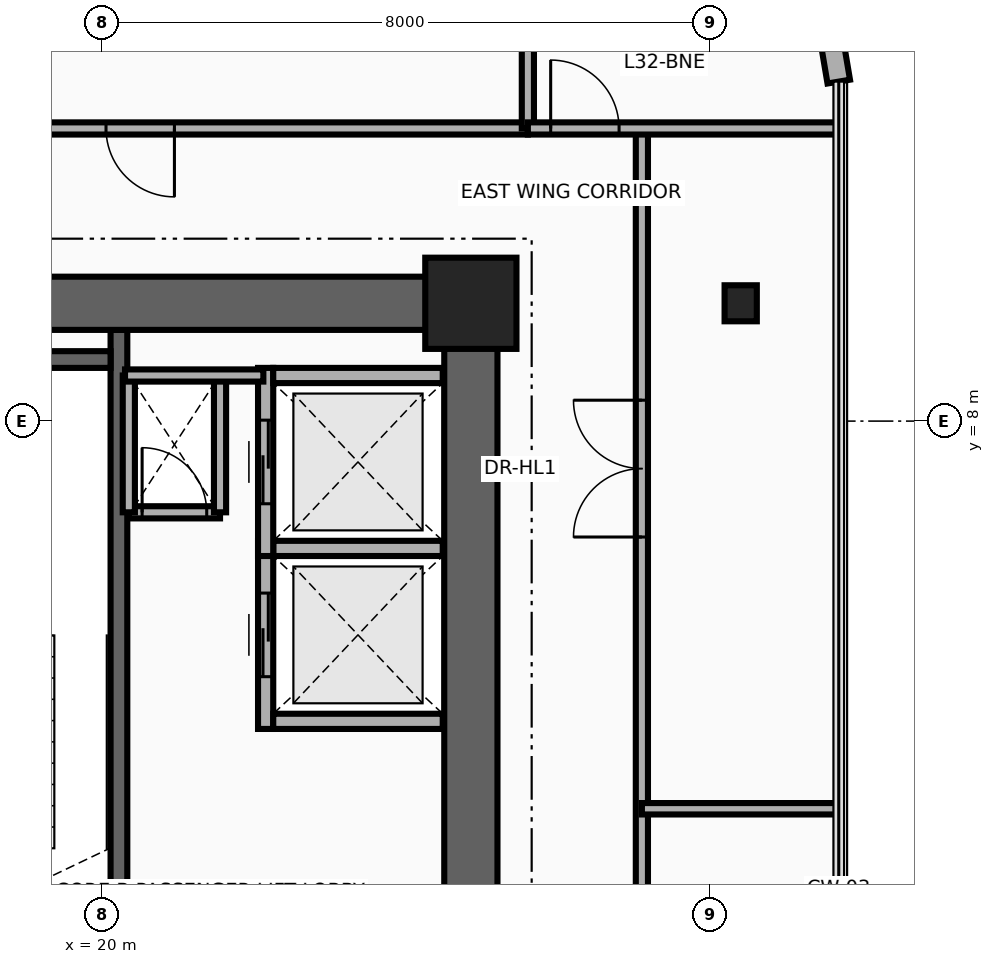
"""IFC4 building model, lengths in metres.
Left out: names, types, materials, properties, quantities, classifications, styles, units other than length and angle.
Written with IfcOpenShell. Run it as: python <this file> out.ifc"""

import sys

from ifc_helpers import new_model, si_unit, direction, frame, frame_2d, origin, origin_2d, place, context, subcontext, project, spatial, rectangle, i_section, extrude, source, transform, mapped, element, fill, save


model = new_model("IFC4")
c1 = context("Model", 3, precision=1e-05, world=origin(), true_north=direction((0.0, 1.0)))
c2 = subcontext(c1, "Body", "Model", "MODEL_VIEW")
j1 = project(units=[si_unit("LENGTHUNIT", "METRE"), si_unit("PLANEANGLEUNIT", "RADIAN")], contexts=[c1])
p1 = place(None, origin())
s1 = spatial("IfcSite", under=j1, at=p1, CompositionType="ELEMENT")
p2 = place(p1, origin())
s2 = spatial("IfcBuilding", under=s1, at=p2, CompositionType="ELEMENT")
p3 = place(p2, frame((0.0, 0.0, 127.9)))
s3 = spatial("IfcBuildingStorey", under=s2, at=p3, CompositionType="ELEMENT", Elevation=127.9)
p4 = place(p3, frame((20.22, 0.68, 0.0), z_axis=(0.0, 0.0, 1.0), x_axis=(0.0, 1.0, 0.0)))
e1 = element("IfcWall", 1, at=p4, inside=s3, PredefinedType="SHEAR", context=c2, shape_type="SweptSolid", body=[
    extrude(rectangle(XDim=8.52, YDim=0.22, at=frame_2d((4.26, 0.0))), origin(), (0.0, 0.0, 1.0), 3.46),
])
p5 = place(p3, frame((17.0, 8.81, 0.0), z_axis=(0.0, 0.0, 1.0), x_axis=(1.0, 0.0, 0.0)))
e2 = element("IfcWall", 2, at=p5, inside=s3, PredefinedType="SHEAR", context=c2, shape_type="SweptSolid", body=[
    extrude(rectangle(XDim=3.11, YDim=0.22, at=frame_2d((1.555, 0.0))), origin(), (0.0, 0.0, 1.0), 3.46),
])
p6 = place(p3, frame((24.85, 0.95, 0.0), z_axis=(0.0, 0.0, 1.0), x_axis=(0.0, 1.0, 0.0)))
e3 = element("IfcWall", 3, at=p6, inside=s3, PredefinedType="SHEAR", context=c2, shape_type="SweptSolid", body=[
    extrude(rectangle(XDim=8.95, YDim=0.7, at=frame_2d((4.475, 0.0))), origin(), (0.0, 0.0, 1.0), 3.46),
])
p7 = place(p3, frame((15.85, 9.55, 0.0), z_axis=(0.0, 0.0, 1.0), x_axis=(1.0, 0.0, 0.0)))
e4 = element("IfcWall", 4, at=p7, inside=s3, PredefinedType="SHEAR", context=c2, shape_type="SweptSolid", body=[
    extrude(rectangle(XDim=9.0, YDim=0.7, at=frame_2d((4.5, 0.0))), origin(), (0.0, 0.0, 1.0), 3.46),
])
m1 = source(origin(), c2, "Body", "SweptSolid", [
    extrude(rectangle(XDim=1.2, YDim=1.2, at=origin_2d()), origin(), (0.0, 0.0, 1.0), 3.7),
])
p8 = place(p3, frame((24.85, 9.55, 0.0), z_axis=(0.0, 0.0, 1.0), x_axis=(1.0, 0.0, 0.0)))
e5 = element("IfcColumn", 5, at=p8, inside=s3, PredefinedType="COLUMN", context=c2, shape_type="MappedRepresentation", body=[
    mapped(m1, transform((0.0, 0.0, 0.0), x_axis=(1.0, 0.0, 0.0), y_axis=(0.0, 1.0, 0.0), z_axis=(0.0, 0.0, 1.0), scale=1.0)),
])
m2 = source(origin(), c2, "Body", "SweptSolid", [
    extrude(i_section(OverallWidth=0.424, OverallDepth=0.474, WebThickness=0.048, FlangeThickness=0.077, at=origin_2d()), origin(), (0.0, 0.0, 1.0), 3.7),
])
p9 = place(p3, frame((28.4, 9.55, 0.0), z_axis=(0.0, 0.0, 1.0), x_axis=(1.0, 0.0, 0.0)))
e6 = element("IfcColumn", 6, at=p9, inside=s3, PredefinedType="COLUMN", context=c2, shape_type="MappedRepresentation", body=[
    mapped(m2, transform((0.0, 0.0, 0.0), x_axis=(1.0, 0.0, 0.0), y_axis=(0.0, 1.0, 0.0), z_axis=(0.0, 0.0, 1.0), scale=1.0)),
])
p10 = place(p3, frame((29.518, 13.488, 0.0), z_axis=(0.0, 0.0, 1.0), x_axis=(0.166156796952, -0.986099345313, 0.0)))
e7 = element("IfcWall", 7, at=p10, inside=s3, PredefinedType="SOLIDWALL", context=c2, shape_type="SweptSolid", body=[
    extrude(rectangle(XDim=1.036, YDim=0.3, at=frame_2d((0.518, 0.0))), origin(), (0.0, 0.0, 1.0), 3.46),
])
p11 = place(p3, frame((22.15, 3.95, 0.0), z_axis=(0.0, 0.0, 1.0), x_axis=(0.0, 1.0, 0.0)))
e8 = element("IfcWall", 8, at=p11, inside=s3, PredefinedType="MOVABLE", context=c2, shape_type="SweptSolid", body=[
    extrude(rectangle(XDim=2.475, YDim=0.2, at=frame_2d((1.238, 0.0))), origin(), (0.0, 0.0, 1.0), 3.46),
])
p12 = place(p11, frame((0.688, 0.0, 0.0)))
e9 = element("IfcOpeningElement", 9, at=p12, cuts=e8, PredefinedType="OPENING", context=c2, shape_type="SweptSolid", body=[
    extrude(rectangle(XDim=1.1, YDim=2.1, at=frame_2d((0.55, 1.05))), frame((0.0, 0.115, 0.0), z_axis=(0.0, -1.0, 0.0), x_axis=(1.0, 0.0, 0.0)), (0.0, 0.0, 1.0), 0.23),
])
for number, where, z_axis, x_axis in (
    (10, (22.25, 4.05, 0.0), (0.0, 0.0, 1.0), (1.0, 0.0, 0.0)),
    (11, (22.25, 6.325, 0.0), (0.0, 0.0, 1.0), (1.0, 0.0, 0.0)),
):
    element("IfcWall", number, at=place(p3, frame(where, z_axis=z_axis, x_axis=x_axis)), inside=s3, PredefinedType="MOVABLE", context=c2, shape_type="SweptSolid", body=[
        extrude(rectangle(XDim=2.23, YDim=0.2, at=frame_2d((1.115, 0.0))), origin(), (0.0, 0.0, 1.0), 2.245),
    ])
p13 = place(p3, frame((22.15, 6.225, 0.0), z_axis=(0.0, 0.0, 1.0), x_axis=(0.0, 1.0, 0.0)))
e12 = element("IfcWall", 12, at=p13, inside=s3, PredefinedType="MOVABLE", context=c2, shape_type="SweptSolid", body=[
    extrude(rectangle(XDim=2.475, YDim=0.2, at=frame_2d((1.237, 0.0))), origin(), (0.0, 0.0, 1.0), 3.46),
])
p14 = place(p13, frame((0.688, 0.0, 0.0)))
e13 = element("IfcOpeningElement", 13, at=p14, cuts=e12, PredefinedType="OPENING", context=c2, shape_type="SweptSolid", body=[
    extrude(rectangle(XDim=1.1, YDim=2.1, at=frame_2d((0.55, 1.05))), frame((0.0, 0.115, 0.0), z_axis=(0.0, -1.0, 0.0), x_axis=(1.0, 0.0, 0.0)), (0.0, 0.0, 1.0), 0.23),
])
p15 = place(p3, frame((22.25, 8.6, 0.0), z_axis=(0.0, 0.0, 1.0), x_axis=(1.0, 0.0, 0.0)))
e14 = element("IfcWall", 14, at=p15, inside=s3, PredefinedType="MOVABLE", context=c2, shape_type="SweptSolid", body=[
    extrude(rectangle(XDim=2.23, YDim=0.2, at=frame_2d((1.115, 0.0))), origin(), (0.0, 0.0, 1.0), 2.245),
])
p16 = place(p3, frame((20.35, 6.8, 0.0), z_axis=(0.0, 0.0, 1.0), x_axis=(1.0, 0.0, 0.0)))
e15 = element("IfcWall", 15, at=p16, inside=s3, PredefinedType="PARTITIONING", context=c2, shape_type="SweptSolid", body=[
    extrude(rectangle(XDim=1.2, YDim=0.16, at=frame_2d((0.6, 0.0))), origin(), (0.0, 0.0, 1.0), 3.46),
])
p17 = place(p16, frame((0.175, 0.0, 0.0)))
e16 = element("IfcOpeningElement", 16, at=p17, cuts=e15, PredefinedType="OPENING", context=c2, shape_type="SweptSolid", body=[
    extrude(rectangle(XDim=0.85, YDim=2.05, at=frame_2d((0.425, 1.025))), frame((0.0, 0.095, 0.0), z_axis=(0.0, -1.0, 0.0), x_axis=(1.0, 0.0, 0.0)), (0.0, 0.0, 1.0), 0.19),
])
for number, where, z_axis, x_axis in (
    (17, (21.55, 6.8, 0.0), (0.0, 0.0, 1.0), (0.0, 1.0, 0.0)),
    (18, (20.35, 6.8, 0.0), (0.0, 0.0, 1.0), (0.0, 1.0, 0.0)),
):
    element("IfcWall", number, at=place(p3, frame(where, z_axis=z_axis, x_axis=x_axis)), inside=s3, PredefinedType="PARTITIONING", context=c2, shape_type="SweptSolid", body=[
        extrude(rectangle(XDim=1.8, YDim=0.16, at=frame_2d((0.9, 0.0))), origin(), (0.0, 0.0, 1.0), 3.46),
    ])
p18 = place(p3, frame((20.3, 8.6, 0.0), z_axis=(0.0, 0.0, 1.0), x_axis=(1.0, 0.0, 0.0)))
e19 = element("IfcWall", 19, at=p18, inside=s3, PredefinedType="PARTITIONING", context=c2, shape_type="SweptSolid", body=[
    extrude(rectangle(XDim=1.82, YDim=0.16, at=frame_2d((0.91, 0.0))), origin(), (0.0, 0.0, 1.0), 3.46),
])
p19 = place(p3, frame((15.4, 11.85, 0.0), z_axis=(0.0, 0.0, 1.0), x_axis=(1.0, 0.0, 0.0)))
e20 = element("IfcWall", 20, at=p19, inside=s3, PredefinedType="PARTITIONING", context=c2, shape_type="SweptSolid", body=[
    extrude(rectangle(XDim=10.2, YDim=0.16, at=frame_2d((5.1, 0.0))), origin(), (0.0, 0.0, 1.0), 2.834),
])
p20 = place(p19, frame((4.65, 0.0, 0.0)))
e21 = element("IfcOpeningElement", 21, at=p20, cuts=e20, PredefinedType="OPENING", context=c2, shape_type="SweptSolid", body=[
    extrude(rectangle(XDim=0.9, YDim=2.1, at=frame_2d((0.45, 1.05))), frame((0.0, 0.095, 0.0), z_axis=(0.0, -1.0, 0.0), x_axis=(1.0, 0.0, 0.0)), (0.0, 0.0, 1.0), 0.19),
])
p21 = place(p3, frame((25.6, 11.85, 0.0), z_axis=(0.0, 0.0, 1.0), x_axis=(0.0, 1.0, 0.0)))
e22 = element("IfcWall", 22, at=p21, inside=s3, PredefinedType="PARTITIONING", context=c2, shape_type="SweptSolid", body=[
    extrude(rectangle(XDim=4.042, YDim=0.16, at=frame_2d((2.021, 0.0))), origin(), (0.0, 0.0, 1.0), 2.666),
])
p22 = place(p3, frame((27.1, -11.661, 0.0), z_axis=(0.0, 0.0, 1.0), x_axis=(0.0, 1.0, 0.0)))
e23 = element("IfcWall", 23, at=p22, inside=s3, PredefinedType="PARTITIONING", context=c2, shape_type="SweptSolid", body=[
    extrude(rectangle(XDim=23.511, YDim=0.16, at=frame_2d((11.755, 0.0))), origin(), (0.0, 0.0, 1.0), 2.666),
])
p23 = place(p22, frame((2.56, 0.0, 0.0)))
e24 = element("IfcOpeningElement", 24, at=p23, cuts=e23, PredefinedType="OPENING", context=c2, shape_type="SweptSolid", body=[
    extrude(rectangle(XDim=0.9, YDim=2.1, at=frame_2d((0.45, 1.05))), frame((0.0, 0.095, 0.0), z_axis=(0.0, -1.0, 0.0), x_axis=(1.0, 0.0, 0.0)), (0.0, 0.0, 1.0), 0.19),
])
p24 = place(p22, frame((9.451, 0.0, 0.0)))
e25 = element("IfcOpeningElement", 25, at=p24, cuts=e23, PredefinedType="OPENING", context=c2, shape_type="SweptSolid", body=[
    extrude(rectangle(XDim=1.8, YDim=2.15, at=frame_2d((0.9, 1.075))), frame((0.0, 0.095, 0.0), z_axis=(0.0, -1.0, 0.0), x_axis=(1.0, 0.0, 0.0)), (0.0, 0.0, 1.0), 0.19),
])
p25 = place(p22, frame((18.136, 0.0, 0.0)))
e26 = element("IfcOpeningElement", 26, at=p25, cuts=e23, PredefinedType="OPENING", context=c2, shape_type="SweptSolid", body=[
    extrude(rectangle(XDim=1.8, YDim=2.15, at=frame_2d((0.9, 1.075))), frame((0.0, 0.095, 0.0), z_axis=(0.0, -1.0, 0.0), x_axis=(1.0, 0.0, 0.0)), (0.0, 0.0, 1.0), 0.19),
])
p26 = place(p3, frame((25.6, 11.85, 0.0), z_axis=(0.0, 0.0, 1.0), x_axis=(1.0, 0.0, 0.0)))
e27 = element("IfcWall", 27, at=p26, inside=s3, PredefinedType="PARTITIONING", context=c2, shape_type="SweptSolid", body=[
    extrude(rectangle(XDim=4.09, YDim=0.16, at=frame_2d((2.045, 0.0))), origin(), (0.0, 0.0, 1.0), 2.896),
])
p27 = place(p26, frame((0.3, 0.0, 0.0)))
e28 = element("IfcOpeningElement", 28, at=p27, cuts=e27, PredefinedType="OPENING", context=c2, shape_type="SweptSolid", body=[
    extrude(rectangle(XDim=0.9, YDim=2.1, at=frame_2d((0.45, 1.05))), frame((0.0, 0.095, 0.0), z_axis=(0.0, -1.0, 0.0), x_axis=(1.0, 0.0, 0.0)), (0.0, 0.0, 1.0), 0.19),
])
p28 = place(p3, frame((27.1, 2.9, 0.0), z_axis=(0.0, 0.0, 1.0), x_axis=(1.0, 0.0, 0.0)))
e29 = element("IfcWall", 29, at=p28, inside=s3, PredefinedType="PARTITIONING", context=c2, shape_type="SweptSolid", body=[
    extrude(rectangle(XDim=2.59, YDim=0.15, at=frame_2d((1.295, 0.0))), origin(), (0.0, 0.0, 1.0), 2.896),
])
p29 = place(p12, origin())
e30 = element("IfcDoor", 30, at=p29, inside=s3, OperationType="DOUBLE_DOOR_SLIDING", PredefinedType="DOOR", context=c2, shape_type="SweptSolid", body=[
    extrude(rectangle(XDim=1.1, YDim=2.1, at=frame_2d((0.55, 1.05))), frame((0.0, 0.025, 0.0), z_axis=(0.0, -1.0, 0.0), x_axis=(1.0, 0.0, 0.0)), (0.0, 0.0, 1.0), 0.05),
])
fill(e9, e30)
p30 = place(p14, origin())
e31 = element("IfcDoor", 31, at=p30, inside=s3, OperationType="DOUBLE_DOOR_SLIDING", PredefinedType="DOOR", context=c2, shape_type="SweptSolid", body=[
    extrude(rectangle(XDim=1.1, YDim=2.1, at=frame_2d((0.55, 1.05))), frame((0.0, 0.025, 0.0), z_axis=(0.0, -1.0, 0.0), x_axis=(1.0, 0.0, 0.0)), (0.0, 0.0, 1.0), 0.05),
])
fill(e13, e31)
p31 = place(p17, origin())
e32 = element("IfcDoor", 32, at=p31, inside=s3, OperationType="SINGLE_SWING_RIGHT", PredefinedType="DOOR", context=c2, shape_type="SweptSolid", body=[
    extrude(rectangle(XDim=0.85, YDim=2.05, at=frame_2d((0.425, 1.025))), frame((0.0, 0.025, 0.0), z_axis=(0.0, -1.0, 0.0), x_axis=(1.0, 0.0, 0.0)), (0.0, 0.0, 1.0), 0.05),
])
fill(e16, e32)
p32 = place(p20, frame((0.9, 0.0, 0.0), z_axis=(0.0, 0.0, 1.0), x_axis=(-1.0, 0.0, 0.0)))
e33 = element("IfcDoor", 33, at=p32, inside=s3, OperationType="SINGLE_SWING_LEFT", PredefinedType="DOOR", context=c2, shape_type="SweptSolid", body=[
    extrude(rectangle(XDim=0.9, YDim=2.1, at=frame_2d((0.45, 1.05))), frame((0.0, 0.025, 0.0), z_axis=(0.0, -1.0, 0.0), x_axis=(1.0, 0.0, 0.0)), (0.0, 0.0, 1.0), 0.05),
])
fill(e21, e33)
p33 = place(p27, origin())
e34 = element("IfcDoor", 34, at=p33, inside=s3, OperationType="SINGLE_SWING_LEFT", PredefinedType="DOOR", context=c2, shape_type="SweptSolid", body=[
    extrude(rectangle(XDim=0.9, YDim=2.1, at=frame_2d((0.45, 1.05))), frame((0.0, 0.025, 0.0), z_axis=(0.0, -1.0, 0.0), x_axis=(1.0, 0.0, 0.0)), (0.0, 0.0, 1.0), 0.05),
])
fill(e28, e34)
p34 = place(p25, origin())
e35 = element("IfcDoor", 35, at=p34, inside=s3, OperationType="DOUBLE_DOOR_SINGLE_SWING", PredefinedType="DOOR", context=c2, shape_type="SweptSolid", body=[
    extrude(rectangle(XDim=1.8, YDim=2.15, at=frame_2d((0.9, 1.075))), frame((0.0, 0.025, 0.0), z_axis=(0.0, -1.0, 0.0), x_axis=(1.0, 0.0, 0.0)), (0.0, 0.0, 1.0), 0.05),
])
fill(e26, e35)
save(model, sys.argv[1])
